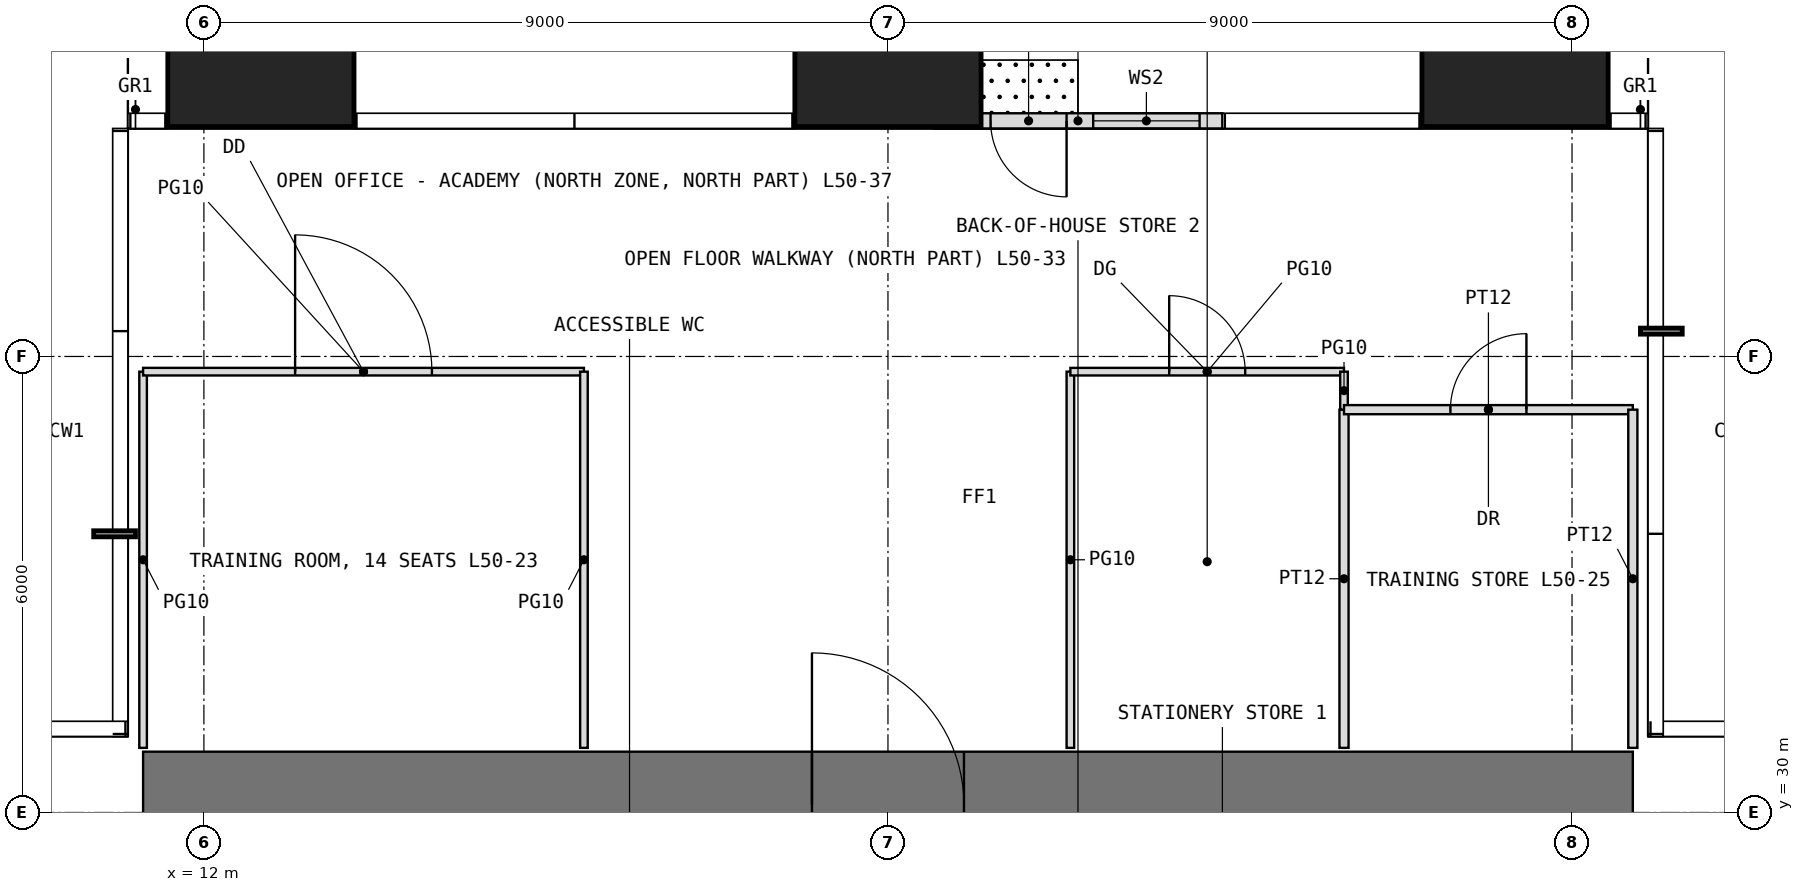
"""IFC4 building model, lengths in metres.
Left out: names, types, materials, properties, quantities, classifications, styles, units other than length and angle.
Written with IfcOpenShell. Run it as: python <this file> out.ifc"""

import sys

from ifc_helpers import new_model, si_unit, direction, frame, frame_2d, origin, origin_2d, place, context, subcontext, project, spatial, rectangle, extrude, element, fill, save


model = new_model("IFC4")
c1 = context("Model", 3, precision=1e-05, world=origin(), true_north=direction((0.0, 1.0)))
c2 = subcontext(c1, "Body", "Model", "MODEL_VIEW")
j1 = project(units=[si_unit("LENGTHUNIT", "METRE"), si_unit("PLANEANGLEUNIT", "RADIAN")], contexts=[c1])
p1 = place(None, origin())
s1 = spatial("IfcSite", under=j1, at=p1, CompositionType="ELEMENT")
p2 = place(p1, origin())
s2 = spatial("IfcBuilding", under=s1, at=p2, CompositionType="ELEMENT")
p3 = place(p2, frame((0.0, 0.0, 210.5)))
s3 = spatial("IfcBuildingStorey", under=s2, at=p3, CompositionType="ELEMENT", Elevation=210.5)
for number, where, z_axis, x_axis in (
    (1, (12.75, 40.25, 0.0), (0.0, 0.0, 1.0), (1.0, 0.0, 0.0)),
    (2, (21.0, 40.25, 0.0), (0.0, 0.0, 1.0), (1.0, 0.0, 0.0)),
    (3, (29.25, 40.25, 0.0), (0.0, 0.0, 1.0), (1.0, 0.0, 0.0)),
):
    element("IfcColumn", number, at=place(p3, frame(where, z_axis=z_axis, x_axis=x_axis)), inside=s3, PredefinedType="COLUMN", context=c2, shape_type="SweptSolid", body=[
        extrude(rectangle(XDim=2.45, YDim=2.45, at=origin_2d()), origin(), (0.0, 0.0, 1.0), 4.0),
    ])
p4 = place(p3, frame((25.4, 39.1, 0.0), z_axis=(0.0, 0.0, 1.0), x_axis=(-1.0, 0.0, 0.0)))
e4 = element("IfcWall", 4, at=p4, inside=s3, PredefinedType="USERDEFINED", context=c2, shape_type="SweptSolid", body=[
    extrude(rectangle(XDim=3.8, YDim=0.2, at=frame_2d((1.9, 0.0))), origin(), (0.0, 0.0, 1.0), 3.75),
])
p5 = place(p4, frame((2.05, 0.0, 0.0)))
e5 = element("IfcOpeningElement", 5, at=p5, cuts=e4, PredefinedType="OPENING", context=c2, shape_type="SweptSolid", body=[
    extrude(rectangle(XDim=1.0, YDim=2.4, at=frame_2d((0.5, 1.2))), frame((0.0, 0.11, 0.0), z_axis=(0.0, -1.0, 0.0), x_axis=(1.0, 0.0, 0.0)), (0.0, 0.0, 1.0), 0.22),
])
p6 = place(p4, frame((0.3, 0.0, 0.3)))
e6 = element("IfcOpeningElement", 6, at=p6, cuts=e4, PredefinedType="OPENING", context=c2, shape_type="SweptSolid", body=[
    extrude(rectangle(XDim=1.4, YDim=2.7, at=frame_2d((0.7, 1.35))), frame((0.0, 0.11, 0.0), z_axis=(0.0, -1.0, 0.0), x_axis=(1.0, 0.0, 0.0)), (0.0, 0.0, 1.0), 0.22),
])
p7 = place(p3, frame((11.2, 30.1, -0.05), z_axis=(0.0, 0.0, 1.0), x_axis=(1.0, 0.0, 0.0)))
e7 = element("IfcWall", 7, at=p7, inside=s3, PredefinedType="SHEAR", context=c2, shape_type="SweptSolid", body=[
    extrude(rectangle(XDim=19.6, YDim=1.4, at=frame_2d((9.8, 0.0))), origin(), (0.0, 0.0, 1.0), 4.0),
])
p8 = place(p7, frame((8.8, 0.0, 0.05)))
e8 = element("IfcOpeningElement", 8, at=p8, cuts=e7, PredefinedType="OPENING", context=c2, shape_type="SweptSolid", body=[
    extrude(rectangle(XDim=2.0, YDim=2.2, at=frame_2d((1.0, 1.1))), frame((0.0, 0.71, 0.0), z_axis=(0.0, -1.0, 0.0), x_axis=(1.0, 0.0, 0.0)), (0.0, 0.0, 1.0), 1.42),
])
p9 = place(p3, frame((11.2, 30.85, 0.0), z_axis=(0.0, 0.0, 1.0), x_axis=(0.0, 1.0, 0.0)))
e9 = element("IfcWall", 9, at=p9, inside=s3, PredefinedType="PARTITIONING", context=c2, shape_type="SweptSolid", body=[
    extrude(rectangle(XDim=4.95, YDim=0.1, at=frame_2d((2.475, 0.0))), origin(), (0.0, 0.0, 1.0), 3.75),
])
p10 = place(p3, frame((11.2, 35.8, 0.0), z_axis=(0.0, 0.0, 1.0), x_axis=(1.0, 0.0, 0.0)))
e10 = element("IfcWall", 10, at=p10, inside=s3, PredefinedType="PARTITIONING", context=c2, shape_type="SweptSolid", body=[
    extrude(rectangle(XDim=5.8, YDim=0.1, at=frame_2d((2.9, 0.0))), origin(), (0.0, 0.0, 1.0), 3.75),
])
p11 = place(p10, frame((2.0, 0.0, 0.0)))
e11 = element("IfcOpeningElement", 11, at=p11, cuts=e10, PredefinedType="OPENING", context=c2, shape_type="SweptSolid", body=[
    extrude(rectangle(XDim=1.8, YDim=2.4, at=frame_2d((0.9, 1.2))), frame((0.0, 0.06, 0.0), z_axis=(0.0, -1.0, 0.0), x_axis=(1.0, 0.0, 0.0)), (0.0, 0.0, 1.0), 0.12),
])
for number, where, z_axis, x_axis in (
    (12, (17.0, 30.85, 0.0), (0.0, 0.0, 1.0), (0.0, 1.0, 0.0)),
    (13, (23.4, 30.85, 0.0), (0.0, 0.0, 1.0), (0.0, 1.0, 0.0)),
):
    element("IfcWall", number, at=place(p3, frame(where, z_axis=z_axis, x_axis=x_axis)), inside=s3, PredefinedType="PARTITIONING", context=c2, shape_type="SweptSolid", body=[
        extrude(rectangle(XDim=4.95, YDim=0.1, at=frame_2d((2.475, 0.0))), origin(), (0.0, 0.0, 1.0), 3.75),
    ])
p12 = place(p3, frame((23.4, 35.8, 0.0), z_axis=(0.0, 0.0, 1.0), x_axis=(1.0, 0.0, 0.0)))
e14 = element("IfcWall", 14, at=p12, inside=s3, PredefinedType="PARTITIONING", context=c2, shape_type="SweptSolid", body=[
    extrude(rectangle(XDim=3.6, YDim=0.1, at=frame_2d((1.8, 0.0))), origin(), (0.0, 0.0, 1.0), 3.75),
])
p13 = place(p12, frame((1.3, 0.0, 0.0)))
e15 = element("IfcOpeningElement", 15, at=p13, cuts=e14, PredefinedType="OPENING", context=c2, shape_type="SweptSolid", body=[
    extrude(rectangle(XDim=1.0, YDim=2.4, at=frame_2d((0.5, 1.2))), frame((0.0, 0.06, 0.0), z_axis=(0.0, -1.0, 0.0), x_axis=(1.0, 0.0, 0.0)), (0.0, 0.0, 1.0), 0.12),
])
p14 = place(p3, frame((27.0, 30.85, 0.0), z_axis=(0.0, 0.0, 1.0), x_axis=(0.0, 1.0, 0.0)))
e16 = element("IfcWall", 16, at=p14, inside=s3, PredefinedType="PARTITIONING", context=c2, shape_type="SweptSolid", body=[
    extrude(rectangle(XDim=4.45, YDim=0.12, at=frame_2d((2.225, 0.0))), origin(), (0.0, 0.0, 1.0), 3.75),
])
p15 = place(p3, frame((27.0, 35.3, 0.0), z_axis=(0.0, 0.0, 1.0), x_axis=(0.0, 1.0, 0.0)))
e17 = element("IfcWall", 17, at=p15, inside=s3, PredefinedType="PARTITIONING", context=c2, shape_type="SweptSolid", body=[
    extrude(rectangle(XDim=0.5, YDim=0.1, at=frame_2d((0.25, 0.0))), origin(), (0.0, 0.0, 1.0), 3.75),
])
p16 = place(p3, frame((27.0, 35.3, 0.0), z_axis=(0.0, 0.0, 1.0), x_axis=(1.0, 0.0, 0.0)))
e18 = element("IfcWall", 18, at=p16, inside=s3, PredefinedType="PARTITIONING", context=c2, shape_type="SweptSolid", body=[
    extrude(rectangle(XDim=3.8, YDim=0.12, at=frame_2d((1.9, 0.0))), origin(), (0.0, 0.0, 1.0), 3.75),
])
p17 = place(p16, frame((1.4, 0.0, 0.0)))
e19 = element("IfcOpeningElement", 19, at=p17, cuts=e18, PredefinedType="OPENING", context=c2, shape_type="SweptSolid", body=[
    extrude(rectangle(XDim=1.0, YDim=2.2, at=frame_2d((0.5, 1.1))), frame((0.0, 0.07, 0.0), z_axis=(0.0, -1.0, 0.0), x_axis=(1.0, 0.0, 0.0)), (0.0, 0.0, 1.0), 0.14),
])
p18 = place(p3, frame((30.8, 30.85, 0.0), z_axis=(0.0, 0.0, 1.0), x_axis=(0.0, 1.0, 0.0)))
e20 = element("IfcWall", 20, at=p18, inside=s3, PredefinedType="PARTITIONING", context=c2, shape_type="SweptSolid", body=[
    extrude(rectangle(XDim=4.45, YDim=0.12, at=frame_2d((2.225, 0.0))), origin(), (0.0, 0.0, 1.0), 3.75),
])
p19 = place(p5, origin())
e21 = element("IfcDoor", 21, at=p19, inside=s3, OperationType="SINGLE_SWING_LEFT", PredefinedType="DOOR", context=c2, shape_type="SweptSolid", body=[
    extrude(rectangle(XDim=1.0, YDim=2.4, at=frame_2d((0.5, 1.2))), frame((0.0, 0.025, 0.0), z_axis=(0.0, -1.0, 0.0), x_axis=(1.0, 0.0, 0.0)), (0.0, 0.0, 1.0), 0.05),
])
fill(e5, e21)
p20 = place(p6, origin())
e22 = element("IfcWindow", 22, at=p20, inside=s3, PartitioningType="SINGLE_PANEL", PredefinedType="WINDOW", context=c2, shape_type="SweptSolid", body=[
    extrude(rectangle(XDim=1.4, YDim=2.7, at=frame_2d((0.7, 1.35))), frame((0.0, 0.03, 0.0), z_axis=(0.0, -1.0, 0.0), x_axis=(1.0, 0.0, 0.0)), (0.0, 0.0, 1.0), 0.06),
])
fill(e6, e22)
p21 = place(p8, origin())
e23 = element("IfcDoor", 23, at=p21, inside=s3, OperationType="DOUBLE_DOOR_SINGLE_SWING", PredefinedType="DOOR", context=c2, shape_type="SweptSolid", body=[
    extrude(rectangle(XDim=2.0, YDim=2.2, at=frame_2d((1.0, 1.1))), frame((0.0, 0.025, 0.0), z_axis=(0.0, -1.0, 0.0), x_axis=(1.0, 0.0, 0.0)), (0.0, 0.0, 1.0), 0.05),
])
fill(e8, e23)
p22 = place(p11, origin())
e24 = element("IfcDoor", 24, at=p22, inside=s3, OperationType="DOUBLE_DOOR_SINGLE_SWING", PredefinedType="DOOR", context=c2, shape_type="SweptSolid", body=[
    extrude(rectangle(XDim=1.8, YDim=2.4, at=frame_2d((0.9, 1.2))), frame((0.0, 0.025, 0.0), z_axis=(0.0, -1.0, 0.0), x_axis=(1.0, 0.0, 0.0)), (0.0, 0.0, 1.0), 0.05),
])
fill(e11, e24)
p23 = place(p13, origin())
e25 = element("IfcDoor", 25, at=p23, inside=s3, OperationType="SINGLE_SWING_LEFT", PredefinedType="DOOR", context=c2, shape_type="SweptSolid", body=[
    extrude(rectangle(XDim=1.0, YDim=2.4, at=frame_2d((0.5, 1.2))), frame((0.0, 0.025, 0.0), z_axis=(0.0, -1.0, 0.0), x_axis=(1.0, 0.0, 0.0)), (0.0, 0.0, 1.0), 0.05),
])
fill(e15, e25)
p24 = place(p17, origin())
e26 = element("IfcDoor", 26, at=p24, inside=s3, OperationType="SINGLE_SWING_RIGHT", PredefinedType="DOOR", context=c2, shape_type="SweptSolid", body=[
    extrude(rectangle(XDim=1.0, YDim=2.2, at=frame_2d((0.5, 1.1))), frame((0.0, 0.025, 0.0), z_axis=(0.0, -1.0, 0.0), x_axis=(1.0, 0.0, 0.0)), (0.0, 0.0, 1.0), 0.05),
])
fill(e19, e26)
save(model, sys.argv[1])
